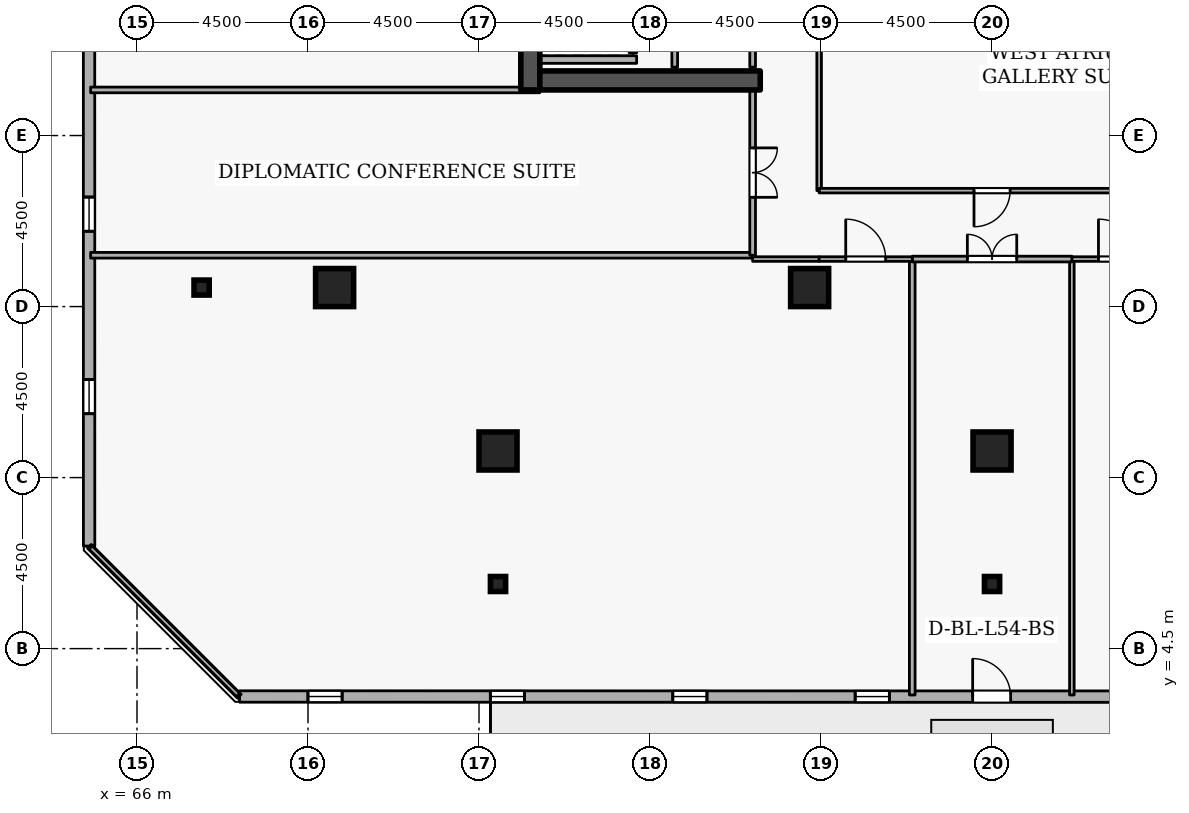
"""IFC4 building model, lengths in metres.
Left out: names, types, materials, properties, quantities, classifications, styles, units other than length and angle.
Written with IfcOpenShell. Run it as: python <this file> out.ifc"""

import sys

from ifc_helpers import new_model, si_unit, direction, frame, frame_2d, origin, origin_2d, place, context, subcontext, project, spatial, rectangle, i_section, extrude, element, fill, save


model = new_model("IFC4")
c1 = context("Model", 3, precision=1e-05, world=origin(), true_north=direction((0.0, 1.0)))
c2 = subcontext(c1, "Body", "Model", "MODEL_VIEW")
j1 = project(units=[si_unit("LENGTHUNIT", "METRE"), si_unit("PLANEANGLEUNIT", "RADIAN")], contexts=[c1])
p1 = place(None, origin())
s1 = spatial("IfcSite", under=j1, at=p1, CompositionType="ELEMENT")
p2 = place(p1, origin())
s2 = spatial("IfcBuilding", under=s1, at=p2, CompositionType="ELEMENT")
p3 = place(p2, frame((0.0, 0.0, 203.7)))
s3 = spatial("IfcBuildingStorey", under=s2, at=p3, CompositionType="ELEMENT", Elevation=203.7)
p4 = place(p3, frame((76.35, 19.2, 0.0), z_axis=(0.0, 0.0, 1.0), x_axis=(0.0, 1.0, 0.0)))
e1 = element("IfcWall", 1, at=p4, inside=s3, PredefinedType="SHEAR", context=c2, shape_type="SweptSolid", body=[
    extrude(rectangle(XDim=15.6, YDim=0.5, at=frame_2d((7.8, 0.0))), origin(), (0.0, 0.0, 1.0), 3.6),
])
p5 = place(p3, frame((76.6, 19.45, 0.0), z_axis=(0.0, 0.0, 1.0), x_axis=(1.0, 0.0, 0.0)))
e2 = element("IfcWall", 2, at=p5, inside=s3, PredefinedType="SHEAR", context=c2, shape_type="SweptSolid", body=[
    extrude(rectangle(XDim=5.8, YDim=0.5, at=frame_2d((2.9, 0.0))), origin(), (0.0, 0.0, 1.0), 3.6),
])
for number, where, z_axis, x_axis in (
    (3, (71.2, 14.0, 0.0), (0.0, 0.0, 1.0), (1.0, 0.0, 0.0)),
    (4, (88.5, 9.7, 0.0), (0.0, 0.0, 1.0), (1.0, 0.0, 0.0)),
    (5, (75.5, 9.7, 0.0), (0.0, 0.0, 1.0), (1.0, 0.0, 0.0)),
    (6, (83.7, 14.0, 0.0), (0.0, 0.0, 1.0), (1.0, 0.0, 0.0)),
):
    element("IfcColumn", number, at=place(p3, frame(where, z_axis=z_axis, x_axis=x_axis)), inside=s3, PredefinedType="COLUMN", context=c2, shape_type="SweptSolid", body=[
        extrude(rectangle(XDim=1.0, YDim=1.0, at=origin_2d()), origin(), (0.0, 0.0, 1.0), 3.6),
    ])
for number, where, z_axis, x_axis in (
    (7, (67.7, 14.0, 0.0), (0.0, 0.0, 1.0), (1.0, 0.0, 0.0)),
    (8, (88.5, 6.2, 0.0), (0.0, 0.0, 1.0), (1.0, 0.0, 0.0)),
    (9, (75.5, 6.2, 0.0), (0.0, 0.0, 1.0), (1.0, 0.0, 0.0)),
):
    element("IfcColumn", number, at=place(p3, frame(where, z_axis=z_axis, x_axis=x_axis)), inside=s3, PredefinedType="COLUMN", context=c2, shape_type="SweptSolid", body=[
        extrude(i_section(OverallWidth=0.399, OverallDepth=0.394, WebThickness=0.023, FlangeThickness=0.037, FilletRadius=0.015, at=origin_2d()), origin(), (0.0, 0.0, 1.0), 3.6),
    ])
p6 = place(p3, frame((68.698, 3.24, 0.0), z_axis=(0.0, 0.0, 1.0), x_axis=(0.999999991209, -0.000132597301, 0.0)))
e10 = element("IfcWall", 10, at=p6, inside=s3, PredefinedType="STANDARD", context=c2, shape_type="SweptSolid", body=[
    extrude(rectangle(XDim=34.983, YDim=0.3, at=frame_2d((17.492, 0.0))), origin(), (0.0, 0.0, 1.0), 2.7),
])
p7 = place(p6, frame((19.292, 0.0, 0.0)))
e11 = element("IfcOpeningElement", 11, at=p7, cuts=e10, PredefinedType="OPENING", context=c2, shape_type="SweptSolid", body=[
    extrude(rectangle(XDim=1.0, YDim=2.08, at=frame_2d((0.5, 1.04))), frame((0.0, 0.16, 0.0), z_axis=(0.0, -1.0, 0.0), x_axis=(1.0, 0.0, 0.0)), (0.0, 0.0, 1.0), 0.32),
])
p8 = place(p6, frame((1.8, 0.0, 0.72)))
e12 = element("IfcOpeningElement", 12, at=p8, cuts=e10, PredefinedType="OPENING", context=c2, shape_type="SweptSolid", body=[
    extrude(rectangle(XDim=0.9, YDim=1.75, at=frame_2d((0.45, 0.875))), frame((0.0, 0.16, 0.0), z_axis=(0.0, -1.0, 0.0), x_axis=(1.0, 0.0, 0.0)), (0.0, 0.0, 1.0), 0.32),
])
p9 = place(p6, frame((6.6, 0.0, 0.72)))
e13 = element("IfcOpeningElement", 13, at=p9, cuts=e10, PredefinedType="OPENING", context=c2, shape_type="SweptSolid", body=[
    extrude(rectangle(XDim=0.9, YDim=1.75, at=frame_2d((0.45, 0.875))), frame((0.0, 0.16, 0.0), z_axis=(0.0, -1.0, 0.0), x_axis=(1.0, 0.0, 0.0)), (0.0, 0.0, 1.0), 0.32),
])
p10 = place(p6, frame((11.4, 0.0, 0.72)))
e14 = element("IfcOpeningElement", 14, at=p10, cuts=e10, PredefinedType="OPENING", context=c2, shape_type="SweptSolid", body=[
    extrude(rectangle(XDim=0.9, YDim=1.75, at=frame_2d((0.45, 0.875))), frame((0.0, 0.16, 0.0), z_axis=(0.0, -1.0, 0.0), x_axis=(1.0, 0.0, 0.0)), (0.0, 0.0, 1.0), 0.32),
])
p11 = place(p6, frame((16.2, 0.0, 0.72)))
e15 = element("IfcOpeningElement", 15, at=p11, cuts=e10, PredefinedType="OPENING", context=c2, shape_type="SweptSolid", body=[
    extrude(rectangle(XDim=0.9, YDim=1.75, at=frame_2d((0.45, 0.875))), frame((0.0, 0.16, 0.0), z_axis=(0.0, -1.0, 0.0), x_axis=(1.0, 0.0, 0.0)), (0.0, 0.0, 1.0), 0.32),
])
p12 = place(p6, frame((25.8, 0.0, 0.72)))
e16 = element("IfcOpeningElement", 16, at=p12, cuts=e10, PredefinedType="OPENING", context=c2, shape_type="SweptSolid", body=[
    extrude(rectangle(XDim=0.9, YDim=1.75, at=frame_2d((0.45, 0.875))), frame((0.0, 0.16, 0.0), z_axis=(0.0, -1.0, 0.0), x_axis=(1.0, 0.0, 0.0)), (0.0, 0.0, 1.0), 0.32),
])
p13 = place(p6, frame((30.6, 0.0, 0.72)))
e17 = element("IfcOpeningElement", 17, at=p13, cuts=e10, PredefinedType="OPENING", context=c2, shape_type="SweptSolid", body=[
    extrude(rectangle(XDim=0.9, YDim=1.75, at=frame_2d((0.45, 0.875))), frame((0.0, 0.16, 0.0), z_axis=(0.0, -1.0, 0.0), x_axis=(1.0, 0.0, 0.0)), (0.0, 0.0, 1.0), 0.32),
])
p14 = place(p3, frame((64.735, 42.181, 0.0), z_axis=(0.0, 0.0, 1.0), x_axis=(0.000132597301, -0.999999991209, 0.0)))
e18 = element("IfcWall", 18, at=p14, inside=s3, PredefinedType="STANDARD", context=c2, shape_type="SweptSolid", body=[
    extrude(rectangle(XDim=34.983, YDim=0.3, at=frame_2d((17.492, 0.0))), origin(), (0.0, 0.0, 1.0), 2.7),
])
p15 = place(p14, frame((1.8, 0.0, 0.72)))
e19 = element("IfcOpeningElement", 19, at=p15, cuts=e18, PredefinedType="OPENING", context=c2, shape_type="SweptSolid", body=[
    extrude(rectangle(XDim=0.9, YDim=1.75, at=frame_2d((0.45, 0.875))), frame((0.0, 0.16, 0.0), z_axis=(0.0, -1.0, 0.0), x_axis=(1.0, 0.0, 0.0)), (0.0, 0.0, 1.0), 0.32),
])
p16 = place(p14, frame((6.6, 0.0, 0.72)))
e20 = element("IfcOpeningElement", 20, at=p16, cuts=e18, PredefinedType="OPENING", context=c2, shape_type="SweptSolid", body=[
    extrude(rectangle(XDim=0.9, YDim=1.75, at=frame_2d((0.45, 0.875))), frame((0.0, 0.16, 0.0), z_axis=(0.0, -1.0, 0.0), x_axis=(1.0, 0.0, 0.0)), (0.0, 0.0, 1.0), 0.32),
])
p17 = place(p14, frame((11.4, 0.0, 0.72)))
e21 = element("IfcOpeningElement", 21, at=p17, cuts=e18, PredefinedType="OPENING", context=c2, shape_type="SweptSolid", body=[
    extrude(rectangle(XDim=0.9, YDim=1.75, at=frame_2d((0.45, 0.875))), frame((0.0, 0.16, 0.0), z_axis=(0.0, -1.0, 0.0), x_axis=(1.0, 0.0, 0.0)), (0.0, 0.0, 1.0), 0.32),
])
p18 = place(p14, frame((16.2, 0.0, 0.72)))
e22 = element("IfcOpeningElement", 22, at=p18, cuts=e18, PredefinedType="OPENING", context=c2, shape_type="SweptSolid", body=[
    extrude(rectangle(XDim=0.9, YDim=1.75, at=frame_2d((0.45, 0.875))), frame((0.0, 0.16, 0.0), z_axis=(0.0, -1.0, 0.0), x_axis=(1.0, 0.0, 0.0)), (0.0, 0.0, 1.0), 0.32),
])
p19 = place(p14, frame((21.0, 0.0, 0.72)))
e23 = element("IfcOpeningElement", 23, at=p19, cuts=e18, PredefinedType="OPENING", context=c2, shape_type="SweptSolid", body=[
    extrude(rectangle(XDim=0.9, YDim=1.75, at=frame_2d((0.45, 0.875))), frame((0.0, 0.16, 0.0), z_axis=(0.0, -1.0, 0.0), x_axis=(1.0, 0.0, 0.0)), (0.0, 0.0, 1.0), 0.32),
])
p20 = place(p14, frame((25.8, 0.0, 0.72)))
e24 = element("IfcOpeningElement", 24, at=p20, cuts=e18, PredefinedType="OPENING", context=c2, shape_type="SweptSolid", body=[
    extrude(rectangle(XDim=0.9, YDim=1.75, at=frame_2d((0.45, 0.875))), frame((0.0, 0.16, 0.0), z_axis=(0.0, -1.0, 0.0), x_axis=(1.0, 0.0, 0.0)), (0.0, 0.0, 1.0), 0.32),
])
p21 = place(p14, frame((30.6, 0.0, 0.72)))
e25 = element("IfcOpeningElement", 25, at=p21, cuts=e18, PredefinedType="OPENING", context=c2, shape_type="SweptSolid", body=[
    extrude(rectangle(XDim=0.9, YDim=1.75, at=frame_2d((0.45, 0.875))), frame((0.0, 0.16, 0.0), z_axis=(0.0, -1.0, 0.0), x_axis=(1.0, 0.0, 0.0)), (0.0, 0.0, 1.0), 0.32),
])
p22 = place(p3, frame((79.05, 20.18, 0.0), z_axis=(0.0, 0.0, 1.0), x_axis=(0.0, 1.0, 0.0)))
e26 = element("IfcWall", 26, at=p22, inside=s3, PredefinedType="STANDARD", context=c2, shape_type="SweptSolid", body=[
    extrude(rectangle(XDim=1.94, YDim=0.2, at=frame_2d((0.97, 0.0))), origin(), (0.0, 0.0, 1.0), 3.34),
])
p23 = place(p22, frame((0.46, 0.0, 0.0)))
e27 = element("IfcOpeningElement", 27, at=p23, cuts=e26, PredefinedType="OPENING", context=c2, shape_type="SweptSolid", body=[
    extrude(rectangle(XDim=1.02, YDim=2.06, at=frame_2d((0.51, 1.03))), frame((0.0, 0.11, 0.0), z_axis=(0.0, -1.0, 0.0), x_axis=(1.0, 0.0, 0.0)), (0.0, 0.0, 1.0), 0.22),
])
p24 = place(p3, frame((76.612, 20.0, 0.0), z_axis=(0.0, 0.0, 1.0), x_axis=(1.0, 0.0, 0.0)))
e28 = element("IfcWall", 28, at=p24, inside=s3, PredefinedType="STANDARD", context=c2, shape_type="SweptSolid", body=[
    extrude(rectangle(XDim=2.536, YDim=0.2, at=frame_2d((1.268, 0.0))), origin(), (0.0, 0.0, 1.0), 3.34),
])
p25 = place(p3, frame((82.2, 19.8, 0.0), z_axis=(0.0, 0.0, 1.0), x_axis=(0.0, 1.0, 0.0)))
e29 = element("IfcWall", 29, at=p25, inside=s3, PredefinedType="PARTITIONING", context=c2, shape_type="SweptSolid", body=[
    extrude(rectangle(XDim=3.3, YDim=0.15, at=frame_2d((1.65, 0.0))), origin(), (0.0, 0.0, 1.0), 3.34),
])
p26 = place(p25, frame((1.19, 0.0, 0.0)))
e30 = element("IfcOpeningElement", 30, at=p26, cuts=e29, PredefinedType="OPENING", context=c2, shape_type="SweptSolid", body=[
    extrude(rectangle(XDim=0.92, YDim=2.08, at=frame_2d((0.46, 1.04))), frame((0.0, 0.085, 0.0), z_axis=(0.0, -1.0, 0.0), x_axis=(1.0, 0.0, 0.0)), (0.0, 0.0, 1.0), 0.17),
])
p27 = place(p3, frame((80.15, 23.1, 0.0), z_axis=(0.0, 0.0, 1.0), x_axis=(0.0, -1.0, 0.0)))
e31 = element("IfcWall", 31, at=p27, inside=s3, PredefinedType="PARTITIONING", context=c2, shape_type="SweptSolid", body=[
    extrude(rectangle(XDim=3.3, YDim=0.15, at=frame_2d((1.65, 0.0))), origin(), (0.0, 0.0, 1.0), 3.34),
])
p28 = place(p3, frame((82.2, 14.85, 0.0), z_axis=(0.0, 0.0, 1.0), x_axis=(-1.0, 0.0, 0.0)))
e32 = element("IfcWall", 32, at=p28, inside=s3, PredefinedType="PARTITIONING", context=c2, shape_type="SweptSolid", body=[
    extrude(rectangle(XDim=17.42, YDim=0.15, at=frame_2d((8.71, 0.0))), origin(), (0.0, 0.0, 1.0), 3.34),
])
p29 = place(p3, frame((64.78, 19.2, 0.0), z_axis=(0.0, 0.0, 1.0), x_axis=(1.0, 0.0, 0.0)))
e33 = element("IfcWall", 33, at=p29, inside=s3, PredefinedType="PARTITIONING", context=c2, shape_type="SweptSolid", body=[
    extrude(rectangle(XDim=11.82, YDim=0.15, at=frame_2d((5.91, 0.0))), origin(), (0.0, 0.0, 1.0), 2.545),
])
p30 = place(p3, frame((82.2, 19.2, 0.0), z_axis=(0.0, 0.0, 1.0), x_axis=(0.0, -1.0, 0.0)))
e34 = element("IfcWall", 34, at=p30, inside=s3, PredefinedType="PARTITIONING", context=c2, shape_type="SweptSolid", body=[
    extrude(rectangle(XDim=4.35, YDim=0.15, at=frame_2d((2.175, 0.0))), origin(), (0.0, 0.0, 1.0), 3.34),
])
p31 = place(p30, frame((1.525, 0.0, 0.0)))
e35 = element("IfcOpeningElement", 35, at=p31, cuts=e34, PredefinedType="OPENING", context=c2, shape_type="SweptSolid", body=[
    extrude(rectangle(XDim=1.3, YDim=2.12, at=frame_2d((0.65, 1.06))), frame((0.0, 0.085, 0.0), z_axis=(0.0, -1.0, 0.0), x_axis=(1.0, 0.0, 0.0)), (0.0, 0.0, 1.0), 0.17),
])
p32 = place(p3, frame((90.6, 3.28, 0.0), z_axis=(0.0, 0.0, 1.0), x_axis=(0.0, 1.0, 0.0)))
e36 = element("IfcWall", 36, at=p32, inside=s3, PredefinedType="PARTITIONING", context=c2, shape_type="SweptSolid", body=[
    extrude(rectangle(XDim=11.47, YDim=0.12, at=frame_2d((5.735, 0.0))), origin(), (0.0, 0.0, 1.0), 3.34),
])
p33 = place(p3, frame((90.6, 14.75, 0.0), z_axis=(0.0, 0.0, 1.0), x_axis=(1.0, 0.0, 0.0)))
e37 = element("IfcWall", 37, at=p33, inside=s3, PredefinedType="PARTITIONING", context=c2, shape_type="SweptSolid", body=[
    extrude(rectangle(XDim=2.45, YDim=0.12, at=frame_2d((1.225, 0.0))), origin(), (0.0, 0.0, 1.0), 3.34),
])
p34 = place(p33, frame((0.7, 0.0, 0.0)))
e38 = element("IfcOpeningElement", 38, at=p34, cuts=e37, PredefinedType="OPENING", context=c2, shape_type="SweptSolid", body=[
    extrude(rectangle(XDim=1.05, YDim=2.1, at=frame_2d((0.525, 1.05))), frame((0.0, 0.07, 0.0), z_axis=(0.0, -1.0, 0.0), x_axis=(1.0, 0.0, 0.0)), (0.0, 0.0, 1.0), 0.14),
])
p35 = place(p3, frame((86.4, 3.28, 0.0), z_axis=(0.0, 0.0, 1.0), x_axis=(0.0, 1.0, 0.0)))
e39 = element("IfcWall", 39, at=p35, inside=s3, PredefinedType="PARTITIONING", context=c2, shape_type="SweptSolid", body=[
    extrude(rectangle(XDim=11.47, YDim=0.15, at=frame_2d((5.735, 0.0))), origin(), (0.0, 0.0, 1.0), 3.34),
])
p36 = place(p3, frame((86.4, 14.75, 0.0), z_axis=(0.0, 0.0, 1.0), x_axis=(1.0, 0.0, 0.0)))
e40 = element("IfcWall", 40, at=p36, inside=s3, PredefinedType="PARTITIONING", context=c2, shape_type="SweptSolid", body=[
    extrude(rectangle(XDim=4.2, YDim=0.15, at=frame_2d((2.1, 0.0))), origin(), (0.0, 0.0, 1.0), 3.34),
])
p37 = place(p36, frame((1.45, 0.0, 0.0)))
e41 = element("IfcOpeningElement", 41, at=p37, cuts=e40, PredefinedType="OPENING", context=c2, shape_type="SweptSolid", body=[
    extrude(rectangle(XDim=1.3, YDim=2.12, at=frame_2d((0.65, 1.06))), frame((0.0, 0.085, 0.0), z_axis=(0.0, -1.0, 0.0), x_axis=(1.0, 0.0, 0.0)), (0.0, 0.0, 1.0), 0.17),
])
p38 = place(p3, frame((68.66, 3.28, 0.0), z_axis=(0.0, 0.0, 1.0), x_axis=(-0.707106781187, 0.707106781187, 0.0)))
e42 = element("IfcWall", 42, at=p38, inside=s3, PredefinedType="PARTITIONING", context=c2, shape_type="SweptSolid", body=[
    extrude(rectangle(XDim=5.487, YDim=0.12, at=frame_2d((2.743, 0.0))), origin(), (0.0, 0.0, 1.0), 3.34),
])
p39 = place(p3, frame((82.2, 14.75, 0.0), z_axis=(0.0, 0.0, 1.0), x_axis=(1.0, 0.0, 0.0)))
e43 = element("IfcWall", 43, at=p39, inside=s3, PredefinedType="PARTITIONING", context=c2, shape_type="SweptSolid", body=[
    extrude(rectangle(XDim=1.75, YDim=0.12, at=frame_2d((0.875, 0.0))), origin(), (0.0, 0.0, 1.0), 3.34),
])
p40 = place(p3, frame((83.95, 14.75, 0.0), z_axis=(0.0, 0.0, 1.0), x_axis=(1.0, 0.0, 0.0)))
e44 = element("IfcWall", 44, at=p40, inside=s3, PredefinedType="PARTITIONING", context=c2, shape_type="SweptSolid", body=[
    extrude(rectangle(XDim=2.45, YDim=0.12, at=frame_2d((1.225, 0.0))), origin(), (0.0, 0.0, 1.0), 3.34),
])
p41 = place(p40, frame((0.7, 0.0, 0.0)))
e45 = element("IfcOpeningElement", 45, at=p41, cuts=e44, PredefinedType="OPENING", context=c2, shape_type="SweptSolid", body=[
    extrude(rectangle(XDim=1.05, YDim=2.1, at=frame_2d((0.525, 1.05))), frame((0.0, 0.07, 0.0), z_axis=(0.0, -1.0, 0.0), x_axis=(1.0, 0.0, 0.0)), (0.0, 0.0, 1.0), 0.14),
])
p42 = place(p3, frame((83.95, 16.55, 0.0), z_axis=(0.0, 0.0, 1.0), x_axis=(0.0, 1.0, 0.0)))
e46 = element("IfcWall", 46, at=p42, inside=s3, PredefinedType="PARTITIONING", context=c2, shape_type="SweptSolid", body=[
    extrude(rectangle(XDim=5.85, YDim=0.12, at=frame_2d((2.925, 0.0))), origin(), (0.0, 0.0, 1.0), 3.34),
])
p43 = place(p3, frame((93.05, 16.55, 0.0), z_axis=(0.0, 0.0, 1.0), x_axis=(-1.0, 0.0, 0.0)))
e47 = element("IfcWall", 47, at=p43, inside=s3, PredefinedType="PARTITIONING", context=c2, shape_type="SweptSolid", body=[
    extrude(rectangle(XDim=9.1, YDim=0.12, at=frame_2d((4.55, 0.0))), origin(), (0.0, 0.0, 1.0), 3.34),
])
p44 = place(p43, frame((4.075, 0.0, 0.0)))
e48 = element("IfcOpeningElement", 48, at=p44, cuts=e47, PredefinedType="OPENING", context=c2, shape_type="SweptSolid", body=[
    extrude(rectangle(XDim=0.95, YDim=2.1, at=frame_2d((0.475, 1.05))), frame((0.0, 0.07, 0.0), z_axis=(0.0, -1.0, 0.0), x_axis=(1.0, 0.0, 0.0)), (0.0, 0.0, 1.0), 0.14),
])
p45 = place(p7, origin())
e49 = element("IfcDoor", 49, at=p45, inside=s3, OperationType="SINGLE_SWING_LEFT", PredefinedType="DOOR", context=c2, shape_type="SweptSolid", body=[
    extrude(rectangle(XDim=1.0, YDim=2.08, at=frame_2d((0.5, 1.04))), frame((0.0, 0.025, 0.0), z_axis=(0.0, -1.0, 0.0), x_axis=(1.0, 0.0, 0.0)), (0.0, 0.0, 1.0), 0.05),
])
fill(e11, e49)
p46 = place(p8, origin())
e50 = element("IfcWindow", 50, at=p46, inside=s3, PartitioningType="SINGLE_PANEL", PredefinedType="WINDOW", context=c2, shape_type="SweptSolid", body=[
    extrude(rectangle(XDim=0.9, YDim=1.75, at=frame_2d((0.45, 0.875))), frame((0.0, 0.03, 0.0), z_axis=(0.0, -1.0, 0.0), x_axis=(1.0, 0.0, 0.0)), (0.0, 0.0, 1.0), 0.06),
])
fill(e12, e50)
p47 = place(p9, origin())
e51 = element("IfcWindow", 51, at=p47, inside=s3, PartitioningType="SINGLE_PANEL", PredefinedType="WINDOW", context=c2, shape_type="SweptSolid", body=[
    extrude(rectangle(XDim=0.9, YDim=1.75, at=frame_2d((0.45, 0.875))), frame((0.0, 0.03, 0.0), z_axis=(0.0, -1.0, 0.0), x_axis=(1.0, 0.0, 0.0)), (0.0, 0.0, 1.0), 0.06),
])
fill(e13, e51)
p48 = place(p10, origin())
e52 = element("IfcWindow", 52, at=p48, inside=s3, PartitioningType="SINGLE_PANEL", PredefinedType="WINDOW", context=c2, shape_type="SweptSolid", body=[
    extrude(rectangle(XDim=0.9, YDim=1.75, at=frame_2d((0.45, 0.875))), frame((0.0, 0.03, 0.0), z_axis=(0.0, -1.0, 0.0), x_axis=(1.0, 0.0, 0.0)), (0.0, 0.0, 1.0), 0.06),
])
fill(e14, e52)
p49 = place(p11, origin())
e53 = element("IfcWindow", 53, at=p49, inside=s3, PartitioningType="SINGLE_PANEL", PredefinedType="WINDOW", context=c2, shape_type="SweptSolid", body=[
    extrude(rectangle(XDim=0.9, YDim=1.75, at=frame_2d((0.45, 0.875))), frame((0.0, 0.03, 0.0), z_axis=(0.0, -1.0, 0.0), x_axis=(1.0, 0.0, 0.0)), (0.0, 0.0, 1.0), 0.06),
])
fill(e15, e53)
p50 = place(p20, origin())
e54 = element("IfcWindow", 54, at=p50, inside=s3, PartitioningType="SINGLE_PANEL", PredefinedType="WINDOW", context=c2, shape_type="SweptSolid", body=[
    extrude(rectangle(XDim=0.9, YDim=1.75, at=frame_2d((0.45, 0.875))), frame((0.0, 0.03, 0.0), z_axis=(0.0, -1.0, 0.0), x_axis=(1.0, 0.0, 0.0)), (0.0, 0.0, 1.0), 0.06),
])
fill(e24, e54)
p51 = place(p21, origin())
e55 = element("IfcWindow", 55, at=p51, inside=s3, PartitioningType="SINGLE_PANEL", PredefinedType="WINDOW", context=c2, shape_type="SweptSolid", body=[
    extrude(rectangle(XDim=0.9, YDim=1.75, at=frame_2d((0.45, 0.875))), frame((0.0, 0.03, 0.0), z_axis=(0.0, -1.0, 0.0), x_axis=(1.0, 0.0, 0.0)), (0.0, 0.0, 1.0), 0.06),
])
fill(e25, e55)
p52 = place(p31, origin())
e56 = element("IfcDoor", 56, at=p52, inside=s3, OperationType="DOUBLE_DOOR_SINGLE_SWING", PredefinedType="DOOR", context=c2, shape_type="SweptSolid", body=[
    extrude(rectangle(XDim=1.3, YDim=2.12, at=frame_2d((0.65, 1.06))), frame((0.0, 0.025, 0.0), z_axis=(0.0, -1.0, 0.0), x_axis=(1.0, 0.0, 0.0)), (0.0, 0.0, 1.0), 0.05),
])
fill(e35, e56)
p53 = place(p34, origin())
e57 = element("IfcDoor", 57, at=p53, inside=s3, OperationType="SINGLE_SWING_LEFT", PredefinedType="DOOR", context=c2, shape_type="SweptSolid", body=[
    extrude(rectangle(XDim=1.05, YDim=2.1, at=frame_2d((0.525, 1.05))), frame((0.0, 0.025, 0.0), z_axis=(0.0, -1.0, 0.0), x_axis=(1.0, 0.0, 0.0)), (0.0, 0.0, 1.0), 0.05),
])
fill(e38, e57)
p54 = place(p37, origin())
e58 = element("IfcDoor", 58, at=p54, inside=s3, OperationType="DOUBLE_DOOR_SINGLE_SWING", PredefinedType="DOOR", context=c2, shape_type="SweptSolid", body=[
    extrude(rectangle(XDim=1.3, YDim=2.12, at=frame_2d((0.65, 1.06))), frame((0.0, 0.025, 0.0), z_axis=(0.0, -1.0, 0.0), x_axis=(1.0, 0.0, 0.0)), (0.0, 0.0, 1.0), 0.05),
])
fill(e41, e58)
p55 = place(p41, origin())
e59 = element("IfcDoor", 59, at=p55, inside=s3, OperationType="SINGLE_SWING_LEFT", PredefinedType="DOOR", context=c2, shape_type="SweptSolid", body=[
    extrude(rectangle(XDim=1.05, YDim=2.1, at=frame_2d((0.525, 1.05))), frame((0.0, 0.025, 0.0), z_axis=(0.0, -1.0, 0.0), x_axis=(1.0, 0.0, 0.0)), (0.0, 0.0, 1.0), 0.05),
])
fill(e45, e59)
p56 = place(p44, origin())
e60 = element("IfcDoor", 60, at=p56, inside=s3, OperationType="SINGLE_SWING_RIGHT", PredefinedType="DOOR", context=c2, shape_type="SweptSolid", body=[
    extrude(rectangle(XDim=0.95, YDim=2.1, at=frame_2d((0.475, 1.05))), frame((0.0, 0.025, 0.0), z_axis=(0.0, -1.0, 0.0), x_axis=(1.0, 0.0, 0.0)), (0.0, 0.0, 1.0), 0.05),
])
fill(e48, e60)
save(model, sys.argv[1])
